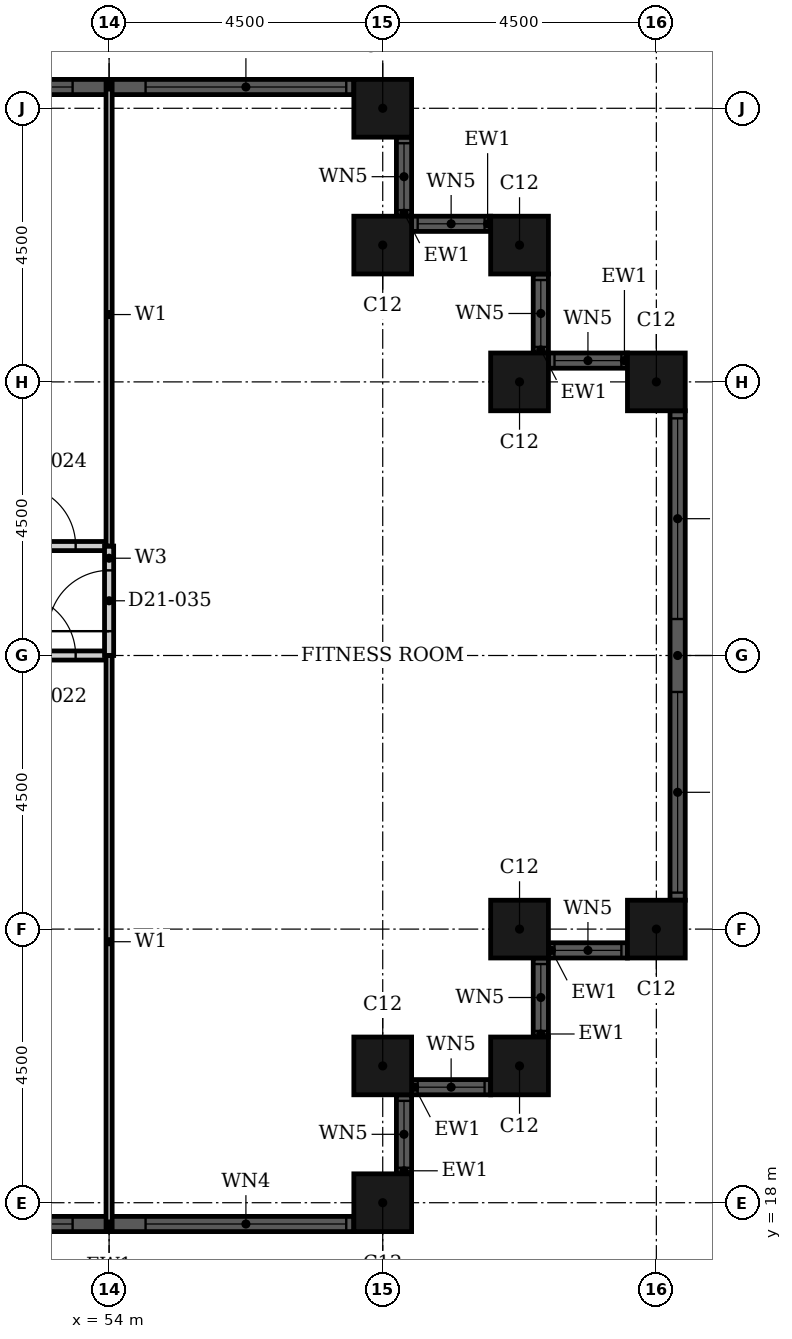
"""IFC4 building model, lengths in metres.
Left out: names, types, materials, properties, quantities, classifications, styles, units other than length and angle.
Written with IfcOpenShell. Run it as: python <this file> out.ifc"""

import sys

from ifc_helpers import new_model, si_unit, direction, frame, frame_2d, origin, origin_2d, place, context, subcontext, project, spatial, rectangle, hollow_rectangle, extrude, element, fill, save


model = new_model("IFC4")
c1 = context("Model", 3, precision=1e-05, world=origin(), true_north=direction((0.0, 1.0)))
c2 = subcontext(c1, "Body", "Model", "MODEL_VIEW")
j1 = project(units=[si_unit("LENGTHUNIT", "METRE"), si_unit("PLANEANGLEUNIT", "RADIAN")], contexts=[c1])
p1 = place(None, origin())
s1 = spatial("IfcSite", under=j1, at=p1, CompositionType="ELEMENT")
p2 = place(p1, origin())
s2 = spatial("IfcBuilding", under=s1, at=p2, CompositionType="ELEMENT")
p3 = place(p2, frame((0.0, 0.0, 88.8)))
s3 = spatial("IfcBuildingStorey", under=s2, at=p3, CompositionType="ELEMENT", Elevation=88.8)
for number, where, z_axis, x_axis in (
    (1, (58.5, 18.0, 0.0), (0.0, 0.0, 1.0), (1.0, 0.0, 0.0)),
    (2, (58.5, 20.25, 0.0), (0.0, 0.0, 1.0), (1.0, 0.0, 0.0)),
    (3, (60.75, 20.25, 0.0), (0.0, 0.0, 1.0), (1.0, 0.0, 0.0)),
    (4, (60.75, 22.5, 0.0), (0.0, 0.0, 1.0), (1.0, 0.0, 0.0)),
    (5, (63.0, 22.5, 0.0), (0.0, 0.0, 1.0), (1.0, 0.0, 0.0)),
    (6, (63.0, 31.5, 0.0), (0.0, 0.0, 1.0), (1.0, 0.0, 0.0)),
    (7, (60.75, 31.5, 0.0), (0.0, 0.0, 1.0), (1.0, 0.0, 0.0)),
    (8, (60.75, 33.75, 0.0), (0.0, 0.0, 1.0), (1.0, 0.0, 0.0)),
    (9, (58.5, 33.75, 0.0), (0.0, 0.0, 1.0), (1.0, 0.0, 0.0)),
    (10, (58.5, 36.0, 0.0), (0.0, 0.0, 1.0), (1.0, 0.0, 0.0)),
):
    element("IfcColumn", number, at=place(p3, frame(where, z_axis=z_axis, x_axis=x_axis)), inside=s3, PredefinedType="COLUMN", context=c2, shape_type="SweptSolid", body=[
        extrude(hollow_rectangle(XDim=0.95, YDim=0.95, WallThickness=0.03, at=origin_2d()), origin(), (0.0, 0.0, 1.0), 3.6),
    ])
p4 = place(p3, frame((49.975, 17.65, 0.0), z_axis=(0.0, 0.0, 1.0), x_axis=(1.0, 0.0, 0.0)))
e11 = element("IfcWall", 11, at=p4, inside=s3, PredefinedType="SOLIDWALL", context=c2, shape_type="SweptSolid", body=[
    extrude(rectangle(XDim=8.05, YDim=0.25, at=frame_2d((4.025, 0.0))), origin(), (0.0, 0.0, 1.0), 3.6),
])
p5 = place(p4, frame((0.125, 0.0, 0.9)))
e12 = element("IfcOpeningElement", 12, at=p5, cuts=e11, PredefinedType="OPENING", context=c2, shape_type="SweptSolid", body=[
    extrude(rectangle(XDim=3.3, YDim=2.08, at=frame_2d((1.65, 1.04))), frame((0.0, 0.135, 0.0), z_axis=(0.0, -1.0, 0.0), x_axis=(1.0, 0.0, 0.0)), (0.0, 0.0, 1.0), 0.27),
])
p6 = place(p4, frame((4.625, 0.0, 0.9)))
e13 = element("IfcOpeningElement", 13, at=p6, cuts=e11, PredefinedType="OPENING", context=c2, shape_type="SweptSolid", body=[
    extrude(rectangle(XDim=3.3, YDim=2.08, at=frame_2d((1.65, 1.04))), frame((0.0, 0.135, 0.0), z_axis=(0.0, -1.0, 0.0), x_axis=(1.0, 0.0, 0.0)), (0.0, 0.0, 1.0), 0.27),
])
p7 = place(p3, frame((58.85, 18.475, 0.0), z_axis=(0.0, 0.0, 1.0), x_axis=(0.0, 1.0, 0.0)))
e14 = element("IfcWall", 14, at=p7, inside=s3, PredefinedType="SOLIDWALL", context=c2, shape_type="SweptSolid", body=[
    extrude(rectangle(XDim=1.3, YDim=0.25, at=frame_2d((0.65, 0.0))), origin(), (0.0, 0.0, 1.0), 3.6),
])
p8 = place(p7, frame((0.1, 0.0, 0.9)))
e15 = element("IfcOpeningElement", 15, at=p8, cuts=e14, PredefinedType="OPENING", context=c2, shape_type="SweptSolid", body=[
    extrude(rectangle(XDim=1.1, YDim=2.08, at=frame_2d((0.55, 1.04))), frame((0.0, 0.135, 0.0), z_axis=(0.0, -1.0, 0.0), x_axis=(1.0, 0.0, 0.0)), (0.0, 0.0, 1.0), 0.27),
])
p9 = place(p3, frame((58.975, 19.9, 0.0), z_axis=(0.0, 0.0, 1.0), x_axis=(1.0, 0.0, 0.0)))
e16 = element("IfcWall", 16, at=p9, inside=s3, PredefinedType="SOLIDWALL", context=c2, shape_type="SweptSolid", body=[
    extrude(rectangle(XDim=1.3, YDim=0.25, at=frame_2d((0.65, 0.0))), origin(), (0.0, 0.0, 1.0), 3.6),
])
p10 = place(p9, frame((0.1, 0.0, 0.9)))
e17 = element("IfcOpeningElement", 17, at=p10, cuts=e16, PredefinedType="OPENING", context=c2, shape_type="SweptSolid", body=[
    extrude(rectangle(XDim=1.1, YDim=2.08, at=frame_2d((0.55, 1.04))), frame((0.0, 0.135, 0.0), z_axis=(0.0, -1.0, 0.0), x_axis=(1.0, 0.0, 0.0)), (0.0, 0.0, 1.0), 0.27),
])
p11 = place(p3, frame((61.1, 20.725, 0.0), z_axis=(0.0, 0.0, 1.0), x_axis=(0.0, 1.0, 0.0)))
e18 = element("IfcWall", 18, at=p11, inside=s3, PredefinedType="SOLIDWALL", context=c2, shape_type="SweptSolid", body=[
    extrude(rectangle(XDim=1.3, YDim=0.25, at=frame_2d((0.65, 0.0))), origin(), (0.0, 0.0, 1.0), 3.6),
])
p12 = place(p11, frame((0.1, 0.0, 0.9)))
e19 = element("IfcOpeningElement", 19, at=p12, cuts=e18, PredefinedType="OPENING", context=c2, shape_type="SweptSolid", body=[
    extrude(rectangle(XDim=1.1, YDim=2.08, at=frame_2d((0.55, 1.04))), frame((0.0, 0.135, 0.0), z_axis=(0.0, -1.0, 0.0), x_axis=(1.0, 0.0, 0.0)), (0.0, 0.0, 1.0), 0.27),
])
p13 = place(p3, frame((61.225, 22.15, 0.0), z_axis=(0.0, 0.0, 1.0), x_axis=(1.0, 0.0, 0.0)))
e20 = element("IfcWall", 20, at=p13, inside=s3, PredefinedType="SOLIDWALL", context=c2, shape_type="SweptSolid", body=[
    extrude(rectangle(XDim=1.3, YDim=0.25, at=frame_2d((0.65, 0.0))), origin(), (0.0, 0.0, 1.0), 3.6),
])
p14 = place(p13, frame((0.1, 0.0, 0.9)))
e21 = element("IfcOpeningElement", 21, at=p14, cuts=e20, PredefinedType="OPENING", context=c2, shape_type="SweptSolid", body=[
    extrude(rectangle(XDim=1.1, YDim=2.08, at=frame_2d((0.55, 1.04))), frame((0.0, 0.135, 0.0), z_axis=(0.0, -1.0, 0.0), x_axis=(1.0, 0.0, 0.0)), (0.0, 0.0, 1.0), 0.27),
])
p15 = place(p3, frame((63.35, 22.975, 0.0), z_axis=(0.0, 0.0, 1.0), x_axis=(0.0, 1.0, 0.0)))
e22 = element("IfcWall", 22, at=p15, inside=s3, PredefinedType="SOLIDWALL", context=c2, shape_type="SweptSolid", body=[
    extrude(rectangle(XDim=8.05, YDim=0.25, at=frame_2d((4.025, 0.0))), origin(), (0.0, 0.0, 1.0), 3.6),
])
p16 = place(p15, frame((0.125, 0.0, 0.9)))
e23 = element("IfcOpeningElement", 23, at=p16, cuts=e22, PredefinedType="OPENING", context=c2, shape_type="SweptSolid", body=[
    extrude(rectangle(XDim=3.3, YDim=2.08, at=frame_2d((1.65, 1.04))), frame((0.0, 0.135, 0.0), z_axis=(0.0, -1.0, 0.0), x_axis=(1.0, 0.0, 0.0)), (0.0, 0.0, 1.0), 0.27),
])
p17 = place(p15, frame((4.625, 0.0, 0.9)))
e24 = element("IfcOpeningElement", 24, at=p17, cuts=e22, PredefinedType="OPENING", context=c2, shape_type="SweptSolid", body=[
    extrude(rectangle(XDim=3.3, YDim=2.08, at=frame_2d((1.65, 1.04))), frame((0.0, 0.135, 0.0), z_axis=(0.0, -1.0, 0.0), x_axis=(1.0, 0.0, 0.0)), (0.0, 0.0, 1.0), 0.27),
])
p18 = place(p3, frame((62.525, 31.85, 0.0), z_axis=(0.0, 0.0, 1.0), x_axis=(-1.0, 0.0, 0.0)))
e25 = element("IfcWall", 25, at=p18, inside=s3, PredefinedType="SOLIDWALL", context=c2, shape_type="SweptSolid", body=[
    extrude(rectangle(XDim=1.3, YDim=0.25, at=frame_2d((0.65, 0.0))), origin(), (0.0, 0.0, 1.0), 3.6),
])
p19 = place(p18, frame((0.1, 0.0, 0.9)))
e26 = element("IfcOpeningElement", 26, at=p19, cuts=e25, PredefinedType="OPENING", context=c2, shape_type="SweptSolid", body=[
    extrude(rectangle(XDim=1.1, YDim=2.08, at=frame_2d((0.55, 1.04))), frame((0.0, 0.135, 0.0), z_axis=(0.0, -1.0, 0.0), x_axis=(1.0, 0.0, 0.0)), (0.0, 0.0, 1.0), 0.27),
])
p20 = place(p3, frame((61.1, 31.975, 0.0), z_axis=(0.0, 0.0, 1.0), x_axis=(0.0, 1.0, 0.0)))
e27 = element("IfcWall", 27, at=p20, inside=s3, PredefinedType="SOLIDWALL", context=c2, shape_type="SweptSolid", body=[
    extrude(rectangle(XDim=1.3, YDim=0.25, at=frame_2d((0.65, 0.0))), origin(), (0.0, 0.0, 1.0), 3.6),
])
p21 = place(p20, frame((0.1, 0.0, 0.9)))
e28 = element("IfcOpeningElement", 28, at=p21, cuts=e27, PredefinedType="OPENING", context=c2, shape_type="SweptSolid", body=[
    extrude(rectangle(XDim=1.1, YDim=2.08, at=frame_2d((0.55, 1.04))), frame((0.0, 0.135, 0.0), z_axis=(0.0, -1.0, 0.0), x_axis=(1.0, 0.0, 0.0)), (0.0, 0.0, 1.0), 0.27),
])
p22 = place(p3, frame((60.275, 34.1, 0.0), z_axis=(0.0, 0.0, 1.0), x_axis=(-1.0, 0.0, 0.0)))
e29 = element("IfcWall", 29, at=p22, inside=s3, PredefinedType="SOLIDWALL", context=c2, shape_type="SweptSolid", body=[
    extrude(rectangle(XDim=1.3, YDim=0.25, at=frame_2d((0.65, 0.0))), origin(), (0.0, 0.0, 1.0), 3.6),
])
p23 = place(p22, frame((0.1, 0.0, 0.9)))
e30 = element("IfcOpeningElement", 30, at=p23, cuts=e29, PredefinedType="OPENING", context=c2, shape_type="SweptSolid", body=[
    extrude(rectangle(XDim=1.1, YDim=2.08, at=frame_2d((0.55, 1.04))), frame((0.0, 0.135, 0.0), z_axis=(0.0, -1.0, 0.0), x_axis=(1.0, 0.0, 0.0)), (0.0, 0.0, 1.0), 0.27),
])
p24 = place(p3, frame((58.85, 34.225, 0.0), z_axis=(0.0, 0.0, 1.0), x_axis=(0.0, 1.0, 0.0)))
e31 = element("IfcWall", 31, at=p24, inside=s3, PredefinedType="SOLIDWALL", context=c2, shape_type="SweptSolid", body=[
    extrude(rectangle(XDim=1.3, YDim=0.25, at=frame_2d((0.65, 0.0))), origin(), (0.0, 0.0, 1.0), 3.6),
])
p25 = place(p24, frame((0.1, 0.0, 0.9)))
e32 = element("IfcOpeningElement", 32, at=p25, cuts=e31, PredefinedType="OPENING", context=c2, shape_type="SweptSolid", body=[
    extrude(rectangle(XDim=1.1, YDim=2.08, at=frame_2d((0.55, 1.04))), frame((0.0, 0.135, 0.0), z_axis=(0.0, -1.0, 0.0), x_axis=(1.0, 0.0, 0.0)), (0.0, 0.0, 1.0), 0.27),
])
p26 = place(p3, frame((58.025, 36.35, 0.0), z_axis=(0.0, 0.0, 1.0), x_axis=(-1.0, 0.0, 0.0)))
e33 = element("IfcWall", 33, at=p26, inside=s3, PredefinedType="SOLIDWALL", context=c2, shape_type="SweptSolid", body=[
    extrude(rectangle(XDim=8.05, YDim=0.25, at=frame_2d((4.025, 0.0))), origin(), (0.0, 0.0, 1.0), 3.6),
])
p27 = place(p26, frame((0.125, 0.0, 0.9)))
e34 = element("IfcOpeningElement", 34, at=p27, cuts=e33, PredefinedType="OPENING", context=c2, shape_type="SweptSolid", body=[
    extrude(rectangle(XDim=3.3, YDim=2.08, at=frame_2d((1.65, 1.04))), frame((0.0, 0.135, 0.0), z_axis=(0.0, -1.0, 0.0), x_axis=(1.0, 0.0, 0.0)), (0.0, 0.0, 1.0), 0.27),
])
p28 = place(p26, frame((4.625, 0.0, 0.9)))
e35 = element("IfcOpeningElement", 35, at=p28, cuts=e33, PredefinedType="OPENING", context=c2, shape_type="SweptSolid", body=[
    extrude(rectangle(XDim=3.3, YDim=2.08, at=frame_2d((1.65, 1.04))), frame((0.0, 0.135, 0.0), z_axis=(0.0, -1.0, 0.0), x_axis=(1.0, 0.0, 0.0)), (0.0, 0.0, 1.0), 0.27),
])
p29 = place(p3, frame((46.8, 27.0, 0.0), z_axis=(0.0, 0.0, 1.0), x_axis=(1.0, 0.0, 0.0)))
e36 = element("IfcWall", 36, at=p29, inside=s3, PredefinedType="PARTITIONING", context=c2, shape_type="SweptSolid", body=[
    extrude(rectangle(XDim=7.2, YDim=0.15, at=frame_2d((3.6, 0.0))), origin(), (0.0, 0.0, 1.0), 2.58),
])
p30 = place(p29, frame((5.65, 0.0, 0.0)))
e37 = element("IfcOpeningElement", 37, at=p30, cuts=e36, PredefinedType="OPENING", context=c2, shape_type="SweptSolid", body=[
    extrude(rectangle(XDim=1.0, YDim=2.1, at=frame_2d((0.5, 1.05))), frame((0.0, 0.085, 0.0), z_axis=(0.0, -1.0, 0.0), x_axis=(1.0, 0.0, 0.0)), (0.0, 0.0, 1.0), 0.17),
])
p31 = place(p3, frame((46.8, 28.8, 0.0), z_axis=(0.0, 0.0, 1.0), x_axis=(1.0, 0.0, 0.0)))
e38 = element("IfcWall", 38, at=p31, inside=s3, PredefinedType="PARTITIONING", context=c2, shape_type="SweptSolid", body=[
    extrude(rectangle(XDim=7.2, YDim=0.15, at=frame_2d((3.6, 0.0))), origin(), (0.0, 0.0, 1.0), 3.3),
])
p32 = place(p31, frame((5.65, 0.0, 0.0)))
e39 = element("IfcOpeningElement", 39, at=p32, cuts=e38, PredefinedType="OPENING", context=c2, shape_type="SweptSolid", body=[
    extrude(rectangle(XDim=1.0, YDim=2.1, at=frame_2d((0.5, 1.05))), frame((0.0, 0.085, 0.0), z_axis=(0.0, -1.0, 0.0), x_axis=(1.0, 0.0, 0.0)), (0.0, 0.0, 1.0), 0.17),
])
p33 = place(p3, frame((54.0, 27.0, 0.0), z_axis=(0.0, 0.0, 1.0), x_axis=(0.0, 1.0, 0.0)))
e40 = element("IfcWall", 40, at=p33, inside=s3, PredefinedType="PARTITIONING", context=c2, shape_type="SweptSolid", body=[
    extrude(rectangle(XDim=1.8, YDim=0.15, at=frame_2d((0.9, 0.0))), origin(), (0.0, 0.0, 1.0), 3.3),
])
p34 = place(p33, frame((0.4, 0.0, 0.0)))
e41 = element("IfcOpeningElement", 41, at=p34, cuts=e40, PredefinedType="OPENING", context=c2, shape_type="SweptSolid", body=[
    extrude(rectangle(XDim=1.0, YDim=2.1, at=frame_2d((0.5, 1.05))), frame((0.0, 0.085, 0.0), z_axis=(0.0, -1.0, 0.0), x_axis=(1.0, 0.0, 0.0)), (0.0, 0.0, 1.0), 0.17),
])
p35 = place(p3, frame((54.0, 28.8, 0.0), z_axis=(0.0, 0.0, 1.0), x_axis=(0.0, 1.0, 0.0)))
e42 = element("IfcWall", 42, at=p35, inside=s3, PredefinedType="PARTITIONING", context=c2, shape_type="SweptSolid", body=[
    extrude(rectangle(XDim=7.615, YDim=0.1, at=frame_2d((3.808, 0.0))), origin(), (0.0, 0.0, 1.0), 3.3),
])
p36 = place(p3, frame((54.0, 17.585, 0.0), z_axis=(0.0, 0.0, 1.0), x_axis=(0.0, 1.0, 0.0)))
e43 = element("IfcWall", 43, at=p36, inside=s3, PredefinedType="PARTITIONING", context=c2, shape_type="SweptSolid", body=[
    extrude(rectangle(XDim=9.415, YDim=0.1, at=frame_2d((4.708, 0.0))), origin(), (0.0, 0.0, 1.0), 3.3),
])
p37 = place(p5, origin())
e44 = element("IfcWindow", 44, at=p37, inside=s3, PartitioningType="SINGLE_PANEL", PredefinedType="WINDOW", context=c2, shape_type="SweptSolid", body=[
    extrude(rectangle(XDim=3.3, YDim=2.08, at=frame_2d((1.65, 1.04))), frame((0.0, 0.03, 0.0), z_axis=(0.0, -1.0, 0.0), x_axis=(1.0, 0.0, 0.0)), (0.0, 0.0, 1.0), 0.06),
])
fill(e12, e44)
p38 = place(p6, origin())
e45 = element("IfcWindow", 45, at=p38, inside=s3, PartitioningType="SINGLE_PANEL", PredefinedType="WINDOW", context=c2, shape_type="SweptSolid", body=[
    extrude(rectangle(XDim=3.3, YDim=2.08, at=frame_2d((1.65, 1.04))), frame((0.0, 0.03, 0.0), z_axis=(0.0, -1.0, 0.0), x_axis=(1.0, 0.0, 0.0)), (0.0, 0.0, 1.0), 0.06),
])
fill(e13, e45)
p39 = place(p8, origin())
e46 = element("IfcWindow", 46, at=p39, inside=s3, PartitioningType="SINGLE_PANEL", PredefinedType="WINDOW", context=c2, shape_type="SweptSolid", body=[
    extrude(rectangle(XDim=1.1, YDim=2.08, at=frame_2d((0.55, 1.04))), frame((0.0, 0.03, 0.0), z_axis=(0.0, -1.0, 0.0), x_axis=(1.0, 0.0, 0.0)), (0.0, 0.0, 1.0), 0.06),
])
fill(e15, e46)
p40 = place(p10, origin())
e47 = element("IfcWindow", 47, at=p40, inside=s3, PartitioningType="SINGLE_PANEL", PredefinedType="WINDOW", context=c2, shape_type="SweptSolid", body=[
    extrude(rectangle(XDim=1.1, YDim=2.08, at=frame_2d((0.55, 1.04))), frame((0.0, 0.03, 0.0), z_axis=(0.0, -1.0, 0.0), x_axis=(1.0, 0.0, 0.0)), (0.0, 0.0, 1.0), 0.06),
])
fill(e17, e47)
p41 = place(p12, origin())
e48 = element("IfcWindow", 48, at=p41, inside=s3, PartitioningType="SINGLE_PANEL", PredefinedType="WINDOW", context=c2, shape_type="SweptSolid", body=[
    extrude(rectangle(XDim=1.1, YDim=2.08, at=frame_2d((0.55, 1.04))), frame((0.0, 0.03, 0.0), z_axis=(0.0, -1.0, 0.0), x_axis=(1.0, 0.0, 0.0)), (0.0, 0.0, 1.0), 0.06),
])
fill(e19, e48)
p42 = place(p14, origin())
e49 = element("IfcWindow", 49, at=p42, inside=s3, PartitioningType="SINGLE_PANEL", PredefinedType="WINDOW", context=c2, shape_type="SweptSolid", body=[
    extrude(rectangle(XDim=1.1, YDim=2.08, at=frame_2d((0.55, 1.04))), frame((0.0, 0.03, 0.0), z_axis=(0.0, -1.0, 0.0), x_axis=(1.0, 0.0, 0.0)), (0.0, 0.0, 1.0), 0.06),
])
fill(e21, e49)
p43 = place(p16, origin())
e50 = element("IfcWindow", 50, at=p43, inside=s3, PartitioningType="SINGLE_PANEL", PredefinedType="WINDOW", context=c2, shape_type="SweptSolid", body=[
    extrude(rectangle(XDim=3.3, YDim=2.08, at=frame_2d((1.65, 1.04))), frame((0.0, 0.03, 0.0), z_axis=(0.0, -1.0, 0.0), x_axis=(1.0, 0.0, 0.0)), (0.0, 0.0, 1.0), 0.06),
])
fill(e23, e50)
p44 = place(p17, origin())
e51 = element("IfcWindow", 51, at=p44, inside=s3, PartitioningType="SINGLE_PANEL", PredefinedType="WINDOW", context=c2, shape_type="SweptSolid", body=[
    extrude(rectangle(XDim=3.3, YDim=2.08, at=frame_2d((1.65, 1.04))), frame((0.0, 0.03, 0.0), z_axis=(0.0, -1.0, 0.0), x_axis=(1.0, 0.0, 0.0)), (0.0, 0.0, 1.0), 0.06),
])
fill(e24, e51)
p45 = place(p19, origin())
e52 = element("IfcWindow", 52, at=p45, inside=s3, PartitioningType="SINGLE_PANEL", PredefinedType="WINDOW", context=c2, shape_type="SweptSolid", body=[
    extrude(rectangle(XDim=1.1, YDim=2.08, at=frame_2d((0.55, 1.04))), frame((0.0, 0.03, 0.0), z_axis=(0.0, -1.0, 0.0), x_axis=(1.0, 0.0, 0.0)), (0.0, 0.0, 1.0), 0.06),
])
fill(e26, e52)
p46 = place(p21, origin())
e53 = element("IfcWindow", 53, at=p46, inside=s3, PartitioningType="SINGLE_PANEL", PredefinedType="WINDOW", context=c2, shape_type="SweptSolid", body=[
    extrude(rectangle(XDim=1.1, YDim=2.08, at=frame_2d((0.55, 1.04))), frame((0.0, 0.03, 0.0), z_axis=(0.0, -1.0, 0.0), x_axis=(1.0, 0.0, 0.0)), (0.0, 0.0, 1.0), 0.06),
])
fill(e28, e53)
p47 = place(p23, origin())
e54 = element("IfcWindow", 54, at=p47, inside=s3, PartitioningType="SINGLE_PANEL", PredefinedType="WINDOW", context=c2, shape_type="SweptSolid", body=[
    extrude(rectangle(XDim=1.1, YDim=2.08, at=frame_2d((0.55, 1.04))), frame((0.0, 0.03, 0.0), z_axis=(0.0, -1.0, 0.0), x_axis=(1.0, 0.0, 0.0)), (0.0, 0.0, 1.0), 0.06),
])
fill(e30, e54)
p48 = place(p25, origin())
e55 = element("IfcWindow", 55, at=p48, inside=s3, PartitioningType="SINGLE_PANEL", PredefinedType="WINDOW", context=c2, shape_type="SweptSolid", body=[
    extrude(rectangle(XDim=1.1, YDim=2.08, at=frame_2d((0.55, 1.04))), frame((0.0, 0.03, 0.0), z_axis=(0.0, -1.0, 0.0), x_axis=(1.0, 0.0, 0.0)), (0.0, 0.0, 1.0), 0.06),
])
fill(e32, e55)
p49 = place(p27, origin())
e56 = element("IfcWindow", 56, at=p49, inside=s3, PartitioningType="SINGLE_PANEL", PredefinedType="WINDOW", context=c2, shape_type="SweptSolid", body=[
    extrude(rectangle(XDim=3.3, YDim=2.08, at=frame_2d((1.65, 1.04))), frame((0.0, 0.03, 0.0), z_axis=(0.0, -1.0, 0.0), x_axis=(1.0, 0.0, 0.0)), (0.0, 0.0, 1.0), 0.06),
])
fill(e34, e56)
p50 = place(p28, origin())
e57 = element("IfcWindow", 57, at=p50, inside=s3, PartitioningType="SINGLE_PANEL", PredefinedType="WINDOW", context=c2, shape_type="SweptSolid", body=[
    extrude(rectangle(XDim=3.3, YDim=2.08, at=frame_2d((1.65, 1.04))), frame((0.0, 0.03, 0.0), z_axis=(0.0, -1.0, 0.0), x_axis=(1.0, 0.0, 0.0)), (0.0, 0.0, 1.0), 0.06),
])
fill(e35, e57)
p51 = place(p30, origin())
e58 = element("IfcDoor", 58, at=p51, inside=s3, OperationType="SINGLE_SWING_RIGHT", PredefinedType="DOOR", context=c2, shape_type="SweptSolid", body=[
    extrude(rectangle(XDim=1.0, YDim=2.1, at=frame_2d((0.5, 1.05))), frame((0.0, 0.025, 0.0), z_axis=(0.0, -1.0, 0.0), x_axis=(1.0, 0.0, 0.0)), (0.0, 0.0, 1.0), 0.05),
])
fill(e37, e58)
p52 = place(p32, origin())
e59 = element("IfcDoor", 59, at=p52, inside=s3, OperationType="SINGLE_SWING_RIGHT", PredefinedType="DOOR", context=c2, shape_type="SweptSolid", body=[
    extrude(rectangle(XDim=1.0, YDim=2.1, at=frame_2d((0.5, 1.05))), frame((0.0, 0.025, 0.0), z_axis=(0.0, -1.0, 0.0), x_axis=(1.0, 0.0, 0.0)), (0.0, 0.0, 1.0), 0.05),
])
fill(e39, e59)
p53 = place(p34, origin())
e60 = element("IfcDoor", 60, at=p53, inside=s3, OperationType="SINGLE_SWING_RIGHT", PredefinedType="DOOR", context=c2, shape_type="SweptSolid", body=[
    extrude(rectangle(XDim=1.0, YDim=2.1, at=frame_2d((0.5, 1.05))), frame((0.0, 0.025, 0.0), z_axis=(0.0, -1.0, 0.0), x_axis=(1.0, 0.0, 0.0)), (0.0, 0.0, 1.0), 0.05),
])
fill(e41, e60)
save(model, sys.argv[1])
